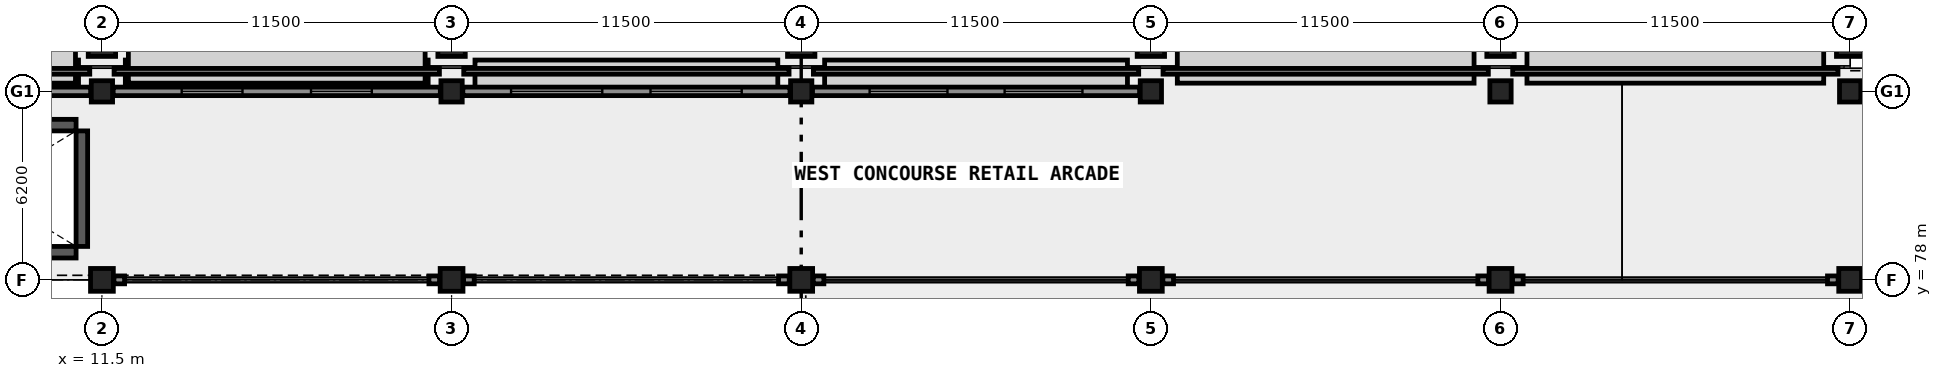
"""IFC4 building model, lengths in metres.
Left out: names, types, materials, properties, quantities, classifications, styles, units other than length and angle.
Written with IfcOpenShell. Run it as: python <this file> out.ifc"""

import sys

from ifc_helpers import new_model, si_unit, direction, frame, frame_2d, origin, origin_2d, place, context, subcontext, project, spatial, rectangle, extrude, element, fill, save


model = new_model("IFC4")
c1 = context("Model", 3, precision=1e-05, world=origin(), true_north=direction((0.0, 1.0)))
c2 = subcontext(c1, "Body", "Model", "MODEL_VIEW")
j1 = project(units=[si_unit("LENGTHUNIT", "METRE"), si_unit("PLANEANGLEUNIT", "RADIAN")], contexts=[c1])
p1 = place(None, origin())
s1 = spatial("IfcSite", under=j1, at=p1, CompositionType="ELEMENT")
p2 = place(p1, origin())
s2 = spatial("IfcBuilding", under=s1, at=p2, CompositionType="ELEMENT")
p3 = place(p2, frame((0.0, 0.0, 8.4)))
s3 = spatial("IfcBuildingStorey", under=s2, at=p3, CompositionType="ELEMENT", Elevation=8.4)
p4 = place(p3, frame((11.5, 78.0, 0.0), z_axis=(0.0, 0.0, 1.0), x_axis=(1.0, 0.0, 0.0)))
e1 = element("IfcColumn", 1, at=p4, inside=s3, PredefinedType="COLUMN", context=c2, shape_type="SweptSolid", body=[
    extrude(rectangle(XDim=0.75, YDim=0.75, at=origin_2d()), origin(), (0.0, 0.0, 1.0), 5.4),
])
p5 = place(p3, frame((11.5, 84.2, 0.0), z_axis=(0.0, 0.0, 1.0), x_axis=(1.0, 0.0, 0.0)))
e2 = element("IfcColumn", 2, at=p5, inside=s3, PredefinedType="COLUMN", context=c2, shape_type="SweptSolid", body=[
    extrude(rectangle(XDim=0.7, YDim=0.7, at=origin_2d()), origin(), (0.0, 0.0, 1.0), 5.4),
])
p6 = place(p3, frame((11.5, 85.8, 0.0), z_axis=(0.0, 0.0, 1.0), x_axis=(1.0, 0.0, 0.0)))
e3 = element("IfcColumn", 3, at=p6, inside=s3, PredefinedType="COLUMN", context=c2, shape_type="SweptSolid", body=[
    extrude(rectangle(XDim=0.9, YDim=0.9, at=origin_2d()), origin(), (0.0, 0.0, 1.0), 5.4),
])
p7 = place(p3, frame((23.0, 78.0, 0.0), z_axis=(0.0, 0.0, 1.0), x_axis=(1.0, 0.0, 0.0)))
e4 = element("IfcColumn", 4, at=p7, inside=s3, PredefinedType="COLUMN", context=c2, shape_type="SweptSolid", body=[
    extrude(rectangle(XDim=0.75, YDim=0.75, at=origin_2d()), origin(), (0.0, 0.0, 1.0), 5.4),
])
p8 = place(p3, frame((23.0, 84.2, 0.0), z_axis=(0.0, 0.0, 1.0), x_axis=(1.0, 0.0, 0.0)))
e5 = element("IfcColumn", 5, at=p8, inside=s3, PredefinedType="COLUMN", context=c2, shape_type="SweptSolid", body=[
    extrude(rectangle(XDim=0.7, YDim=0.7, at=origin_2d()), origin(), (0.0, 0.0, 1.0), 5.4),
])
p9 = place(p3, frame((23.0, 85.8, 0.0), z_axis=(0.0, 0.0, 1.0), x_axis=(1.0, 0.0, 0.0)))
e6 = element("IfcColumn", 6, at=p9, inside=s3, PredefinedType="COLUMN", context=c2, shape_type="SweptSolid", body=[
    extrude(rectangle(XDim=0.9, YDim=0.9, at=origin_2d()), origin(), (0.0, 0.0, 1.0), 5.4),
])
p10 = place(p3, frame((34.5, 78.0, 0.0), z_axis=(0.0, 0.0, 1.0), x_axis=(1.0, 0.0, 0.0)))
e7 = element("IfcColumn", 7, at=p10, inside=s3, PredefinedType="COLUMN", context=c2, shape_type="SweptSolid", body=[
    extrude(rectangle(XDim=0.75, YDim=0.75, at=origin_2d()), origin(), (0.0, 0.0, 1.0), 5.4),
])
p11 = place(p3, frame((34.5, 84.2, 0.0), z_axis=(0.0, 0.0, 1.0), x_axis=(1.0, 0.0, 0.0)))
e8 = element("IfcColumn", 8, at=p11, inside=s3, PredefinedType="COLUMN", context=c2, shape_type="SweptSolid", body=[
    extrude(rectangle(XDim=0.7, YDim=0.7, at=origin_2d()), origin(), (0.0, 0.0, 1.0), 5.4),
])
p12 = place(p3, frame((34.5, 85.8, 0.0), z_axis=(0.0, 0.0, 1.0), x_axis=(1.0, 0.0, 0.0)))
e9 = element("IfcColumn", 9, at=p12, inside=s3, PredefinedType="COLUMN", context=c2, shape_type="SweptSolid", body=[
    extrude(rectangle(XDim=0.9, YDim=0.9, at=origin_2d()), origin(), (0.0, 0.0, 1.0), 5.4),
])
p13 = place(p3, frame((46.0, 78.0, 0.0), z_axis=(0.0, 0.0, 1.0), x_axis=(1.0, 0.0, 0.0)))
e10 = element("IfcColumn", 10, at=p13, inside=s3, PredefinedType="COLUMN", context=c2, shape_type="SweptSolid", body=[
    extrude(rectangle(XDim=0.75, YDim=0.75, at=origin_2d()), origin(), (0.0, 0.0, 1.0), 5.4),
])
p14 = place(p3, frame((46.0, 84.2, 0.0), z_axis=(0.0, 0.0, 1.0), x_axis=(1.0, 0.0, 0.0)))
e11 = element("IfcColumn", 11, at=p14, inside=s3, PredefinedType="COLUMN", context=c2, shape_type="SweptSolid", body=[
    extrude(rectangle(XDim=0.7, YDim=0.7, at=origin_2d()), origin(), (0.0, 0.0, 1.0), 5.4),
])
p15 = place(p3, frame((46.0, 85.8, 0.0), z_axis=(0.0, 0.0, 1.0), x_axis=(1.0, 0.0, 0.0)))
e12 = element("IfcColumn", 12, at=p15, inside=s3, PredefinedType="COLUMN", context=c2, shape_type="SweptSolid", body=[
    extrude(rectangle(XDim=0.9, YDim=0.9, at=origin_2d()), origin(), (0.0, 0.0, 1.0), 5.4),
])
p16 = place(p3, frame((57.5, 78.0, 0.0), z_axis=(0.0, 0.0, 1.0), x_axis=(1.0, 0.0, 0.0)))
e13 = element("IfcColumn", 13, at=p16, inside=s3, PredefinedType="COLUMN", context=c2, shape_type="SweptSolid", body=[
    extrude(rectangle(XDim=0.75, YDim=0.75, at=origin_2d()), origin(), (0.0, 0.0, 1.0), 5.4),
])
p17 = place(p3, frame((57.5, 84.2, 0.0), z_axis=(0.0, 0.0, 1.0), x_axis=(1.0, 0.0, 0.0)))
e14 = element("IfcColumn", 14, at=p17, inside=s3, PredefinedType="COLUMN", context=c2, shape_type="SweptSolid", body=[
    extrude(rectangle(XDim=0.7, YDim=0.7, at=origin_2d()), origin(), (0.0, 0.0, 1.0), 5.4),
])
p18 = place(p3, frame((57.5, 85.8, 0.0), z_axis=(0.0, 0.0, 1.0), x_axis=(1.0, 0.0, 0.0)))
e15 = element("IfcColumn", 15, at=p18, inside=s3, PredefinedType="COLUMN", context=c2, shape_type="SweptSolid", body=[
    extrude(rectangle(XDim=0.9, YDim=0.9, at=origin_2d()), origin(), (0.0, 0.0, 1.0), 5.4),
])
p19 = place(p3, frame((69.0, 78.0, 0.0), z_axis=(0.0, 0.0, 1.0), x_axis=(1.0, 0.0, 0.0)))
e16 = element("IfcColumn", 16, at=p19, inside=s3, PredefinedType="COLUMN", context=c2, shape_type="SweptSolid", body=[
    extrude(rectangle(XDim=0.75, YDim=0.75, at=origin_2d()), origin(), (0.0, 0.0, 1.0), 5.4),
])
p20 = place(p3, frame((69.0, 84.2, 0.0), z_axis=(0.0, 0.0, 1.0), x_axis=(1.0, 0.0, 0.0)))
e17 = element("IfcColumn", 17, at=p20, inside=s3, PredefinedType="COLUMN", context=c2, shape_type="SweptSolid", body=[
    extrude(rectangle(XDim=0.7, YDim=0.7, at=origin_2d()), origin(), (0.0, 0.0, 1.0), 5.4),
])
p21 = place(p3, frame((69.0, 85.8, 0.0), z_axis=(0.0, 0.0, 1.0), x_axis=(1.0, 0.0, 0.0)))
e18 = element("IfcColumn", 18, at=p21, inside=s3, PredefinedType="COLUMN", context=c2, shape_type="SweptSolid", body=[
    extrude(rectangle(XDim=0.9, YDim=0.9, at=origin_2d()), origin(), (0.0, 0.0, 1.0), 5.4),
])
p22 = place(p3, frame((2.05, 78.91, 0.0), z_axis=(0.0, 0.0, 1.0), x_axis=(1.0, 0.0, 0.0)))
e19 = element("IfcWall", 19, at=p22, inside=s3, PredefinedType="SHEAR", context=c2, shape_type="SweptSolid", body=[
    extrude(rectangle(XDim=8.6, YDim=0.38, at=frame_2d((4.3, 0.0))), origin(), (0.0, 0.0, 1.0), 5.4),
])
p23 = place(p22, frame((0.55, 0.0, 0.0)))
e20 = element("IfcOpeningElement", 20, at=p23, cuts=e19, PredefinedType="OPENING", context=c2, shape_type="SweptSolid", body=[
    extrude(rectangle(XDim=1.13, YDim=2.15, at=frame_2d((0.565, 1.075))), frame((0.0, 0.2, 0.0), z_axis=(0.0, -1.0, 0.0), x_axis=(1.0, 0.0, 0.0)), (0.0, 0.0, 1.0), 0.4),
])
p24 = place(p3, frame((2.05, 83.09, 0.0), z_axis=(0.0, 0.0, 1.0), x_axis=(1.0, 0.0, 0.0)))
e21 = element("IfcWall", 21, at=p24, inside=s3, PredefinedType="SHEAR", context=c2, shape_type="SweptSolid", body=[
    extrude(rectangle(XDim=8.6, YDim=0.38, at=frame_2d((4.3, 0.0))), origin(), (0.0, 0.0, 1.0), 5.4),
])
p25 = place(p3, frame((10.84, 79.1, 0.0), z_axis=(0.0, 0.0, 1.0), x_axis=(0.0, 1.0, 0.0)))
e22 = element("IfcWall", 22, at=p25, inside=s3, PredefinedType="SHEAR", context=c2, shape_type="SweptSolid", body=[
    extrude(rectangle(XDim=3.8, YDim=0.38, at=frame_2d((1.9, 0.0))), origin(), (0.0, 0.0, 1.0), 5.4),
])
for number, where, z_axis, x_axis in (
    (23, (11.895, 78.0, 0.0), (0.0, 0.0, 1.0), (1.0, 0.0, 0.0)),
    (24, (22.255, 78.0, 0.0), (0.0, 0.0, 1.0), (1.0, 0.0, 0.0)),
    (25, (23.395, 78.0, 0.0), (0.0, 0.0, 1.0), (1.0, 0.0, 0.0)),
    (26, (33.755, 78.0, 0.0), (0.0, 0.0, 1.0), (1.0, 0.0, 0.0)),
    (27, (34.895, 78.0, 0.0), (0.0, 0.0, 1.0), (1.0, 0.0, 0.0)),
    (28, (45.255, 78.0, 0.0), (0.0, 0.0, 1.0), (1.0, 0.0, 0.0)),
    (29, (46.395, 78.0, 0.0), (0.0, 0.0, 1.0), (1.0, 0.0, 0.0)),
    (30, (56.755, 78.0, 0.0), (0.0, 0.0, 1.0), (1.0, 0.0, 0.0)),
    (31, (57.895, 78.0, 0.0), (0.0, 0.0, 1.0), (1.0, 0.0, 0.0)),
    (32, (68.255, 78.0, 0.0), (0.0, 0.0, 1.0), (1.0, 0.0, 0.0)),
    (33, (69.395, 78.0, 0.0), (0.0, 0.0, 1.0), (1.0, 0.0, 0.0)),
):
    element("IfcWall", number, at=place(p3, frame(where, z_axis=z_axis, x_axis=x_axis)), inside=s3, PredefinedType="SOLIDWALL", context=c2, shape_type="SweptSolid", body=[
        extrude(rectangle(XDim=0.35, YDim=0.26, at=frame_2d((0.175, 0.0))), origin(), (0.0, 0.0, 1.0), 5.1),
    ])
p26 = place(p3, frame((69.37, 84.2, 0.0), z_axis=(0.0, 0.0, 1.0), x_axis=(1.0, 0.0, 0.0)))
e34 = element("IfcWall", 34, at=p26, inside=s3, PredefinedType="SOLIDWALL", context=c2, shape_type="SweptSolid", body=[
    extrude(rectangle(XDim=0.35, YDim=0.26, at=frame_2d((0.175, 0.0))), origin(), (0.0, 0.0, 1.0), 5.1),
])
for number, where, z_axis, x_axis in (
    (35, (0.4, 84.86, 0.0), (0.0, 0.0, 1.0), (1.0, 0.0, 0.0)),
    (36, (11.9, 84.86, 0.0), (0.0, 0.0, 1.0), (1.0, 0.0, 0.0)),
    (37, (23.4, 84.86, 0.0), (0.0, 0.0, 1.0), (1.0, 0.0, 0.0)),
    (38, (34.9, 84.86, 0.0), (0.0, 0.0, 1.0), (1.0, 0.0, 0.0)),
    (39, (46.4, 84.86, 0.0), (0.0, 0.0, 1.0), (1.0, 0.0, 0.0)),
    (40, (57.9, 84.86, 0.0), (0.0, 0.0, 1.0), (1.0, 0.0, 0.0)),
):
    element("IfcWall", number, at=place(p3, frame(where, z_axis=z_axis, x_axis=x_axis)), inside=s3, PredefinedType="PARAPET", context=c2, shape_type="SweptSolid", body=[
        extrude(rectangle(XDim=10.7, YDim=0.19, at=frame_2d((5.35, 0.0))), origin(), (0.0, 0.0, 1.0), 1.15),
    ])
p27 = place(p3, frame((34.87, 84.2, 0.0), z_axis=(0.0, 0.0, 1.0), x_axis=(1.0, 0.0, 0.0)))
e41 = element("IfcWall", 41, at=p27, inside=s3, PredefinedType="SOLIDWALL", context=c2, shape_type="SweptSolid", body=[
    extrude(rectangle(XDim=10.76, YDim=0.28, at=frame_2d((5.38, 0.0))), origin(), (0.0, 0.0, 1.0), 4.25),
])
p28 = place(p27, frame((1.88, 0.0, 0.85)))
e42 = element("IfcOpeningElement", 42, at=p28, cuts=e41, PredefinedType="OPENING", context=c2, shape_type="SweptSolid", body=[
    extrude(rectangle(XDim=2.56, YDim=2.18, at=frame_2d((1.28, 1.09))), frame((0.0, 0.15, 0.0), z_axis=(0.0, -1.0, 0.0), x_axis=(1.0, 0.0, 0.0)), (0.0, 0.0, 1.0), 0.3),
])
p29 = place(p27, frame((6.32, 0.0, 0.85)))
e43 = element("IfcOpeningElement", 43, at=p29, cuts=e41, PredefinedType="OPENING", context=c2, shape_type="SweptSolid", body=[
    extrude(rectangle(XDim=2.56, YDim=2.18, at=frame_2d((1.28, 1.09))), frame((0.0, 0.15, 0.0), z_axis=(0.0, -1.0, 0.0), x_axis=(1.0, 0.0, 0.0)), (0.0, 0.0, 1.0), 0.3),
])
p30 = place(p3, frame((0.37, 84.2, 0.0), z_axis=(0.0, 0.0, 1.0), x_axis=(1.0, 0.0, 0.0)))
e44 = element("IfcWall", 44, at=p30, inside=s3, PredefinedType="SOLIDWALL", context=c2, shape_type="SweptSolid", body=[
    extrude(rectangle(XDim=10.76, YDim=0.28, at=frame_2d((5.38, 0.0))), origin(), (0.0, 0.0, 1.0), 4.25),
])
p31 = place(p30, frame((1.92, 0.0, 0.85)))
e45 = element("IfcOpeningElement", 45, at=p31, cuts=e44, PredefinedType="OPENING", context=c2, shape_type="SweptSolid", body=[
    extrude(rectangle(XDim=2.5, YDim=2.2, at=frame_2d((1.25, 1.1))), frame((0.0, 0.15, 0.0), z_axis=(0.0, -1.0, 0.0), x_axis=(1.0, 0.0, 0.0)), (0.0, 0.0, 1.0), 0.3),
])
p32 = place(p30, frame((6.34, 0.0, 0.85)))
e46 = element("IfcOpeningElement", 46, at=p32, cuts=e44, PredefinedType="OPENING", context=c2, shape_type="SweptSolid", body=[
    extrude(rectangle(XDim=2.5, YDim=2.2, at=frame_2d((1.25, 1.1))), frame((0.0, 0.15, 0.0), z_axis=(0.0, -1.0, 0.0), x_axis=(1.0, 0.0, 0.0)), (0.0, 0.0, 1.0), 0.3),
])
p33 = place(p3, frame((11.87, 84.2, 0.0), z_axis=(0.0, 0.0, 1.0), x_axis=(1.0, 0.0, 0.0)))
e47 = element("IfcWall", 47, at=p33, inside=s3, PredefinedType="SOLIDWALL", context=c2, shape_type="SweptSolid", body=[
    extrude(rectangle(XDim=10.76, YDim=0.28, at=frame_2d((5.38, 0.0))), origin(), (0.0, 0.0, 1.0), 4.25),
])
p34 = place(p33, frame((2.253, 0.0, 0.85)))
e48 = element("IfcOpeningElement", 48, at=p34, cuts=e47, PredefinedType="OPENING", context=c2, shape_type="SweptSolid", body=[
    extrude(rectangle(XDim=2.0, YDim=2.2, at=frame_2d((1.0, 1.1))), frame((0.0, 0.15, 0.0), z_axis=(0.0, -1.0, 0.0), x_axis=(1.0, 0.0, 0.0)), (0.0, 0.0, 1.0), 0.3),
])
p35 = place(p33, frame((6.507, 0.0, 0.85)))
e49 = element("IfcOpeningElement", 49, at=p35, cuts=e47, PredefinedType="OPENING", context=c2, shape_type="SweptSolid", body=[
    extrude(rectangle(XDim=2.0, YDim=2.2, at=frame_2d((1.0, 1.1))), frame((0.0, 0.15, 0.0), z_axis=(0.0, -1.0, 0.0), x_axis=(1.0, 0.0, 0.0)), (0.0, 0.0, 1.0), 0.3),
])
p36 = place(p3, frame((23.37, 84.2, 0.0), z_axis=(0.0, 0.0, 1.0), x_axis=(1.0, 0.0, 0.0)))
e50 = element("IfcWall", 50, at=p36, inside=s3, PredefinedType="SOLIDWALL", context=c2, shape_type="SweptSolid", body=[
    extrude(rectangle(XDim=10.76, YDim=0.28, at=frame_2d((5.38, 0.0))), origin(), (0.0, 0.0, 1.0), 4.25),
])
p37 = place(p36, frame((1.587, 0.0, 0.85)))
e51 = element("IfcOpeningElement", 51, at=p37, cuts=e50, PredefinedType="OPENING", context=c2, shape_type="SweptSolid", body=[
    extrude(rectangle(XDim=3.0, YDim=2.0, at=frame_2d((1.5, 1.0))), frame((0.0, 0.15, 0.0), z_axis=(0.0, -1.0, 0.0), x_axis=(1.0, 0.0, 0.0)), (0.0, 0.0, 1.0), 0.3),
])
p38 = place(p36, frame((6.173, 0.0, 0.85)))
e52 = element("IfcOpeningElement", 52, at=p38, cuts=e50, PredefinedType="OPENING", context=c2, shape_type="SweptSolid", body=[
    extrude(rectangle(XDim=3.0, YDim=2.0, at=frame_2d((1.5, 1.0))), frame((0.0, 0.15, 0.0), z_axis=(0.0, -1.0, 0.0), x_axis=(1.0, 0.0, 0.0)), (0.0, 0.0, 1.0), 0.3),
])
p39 = place(p28, origin())
e53 = element("IfcWindow", 53, at=p39, inside=s3, PartitioningType="SINGLE_PANEL", PredefinedType="WINDOW", context=c2, shape_type="SweptSolid", body=[
    extrude(rectangle(XDim=2.56, YDim=2.18, at=frame_2d((1.28, 1.09))), frame((0.0, 0.03, 0.0), z_axis=(0.0, -1.0, 0.0), x_axis=(1.0, 0.0, 0.0)), (0.0, 0.0, 1.0), 0.06),
])
fill(e42, e53)
p40 = place(p29, origin())
e54 = element("IfcWindow", 54, at=p40, inside=s3, PartitioningType="SINGLE_PANEL", PredefinedType="WINDOW", context=c2, shape_type="SweptSolid", body=[
    extrude(rectangle(XDim=2.56, YDim=2.18, at=frame_2d((1.28, 1.09))), frame((0.0, 0.03, 0.0), z_axis=(0.0, -1.0, 0.0), x_axis=(1.0, 0.0, 0.0)), (0.0, 0.0, 1.0), 0.06),
])
fill(e43, e54)
p41 = place(p34, origin())
e55 = element("IfcWindow", 55, at=p41, inside=s3, PartitioningType="SINGLE_PANEL", PredefinedType="WINDOW", context=c2, shape_type="SweptSolid", body=[
    extrude(rectangle(XDim=2.0, YDim=2.2, at=frame_2d((1.0, 1.1))), frame((0.0, 0.03, 0.0), z_axis=(0.0, -1.0, 0.0), x_axis=(1.0, 0.0, 0.0)), (0.0, 0.0, 1.0), 0.06),
])
fill(e48, e55)
p42 = place(p35, origin())
e56 = element("IfcWindow", 56, at=p42, inside=s3, PartitioningType="SINGLE_PANEL", PredefinedType="WINDOW", context=c2, shape_type="SweptSolid", body=[
    extrude(rectangle(XDim=2.0, YDim=2.2, at=frame_2d((1.0, 1.1))), frame((0.0, 0.03, 0.0), z_axis=(0.0, -1.0, 0.0), x_axis=(1.0, 0.0, 0.0)), (0.0, 0.0, 1.0), 0.06),
])
fill(e49, e56)
p43 = place(p37, origin())
e57 = element("IfcWindow", 57, at=p43, inside=s3, PartitioningType="SINGLE_PANEL", PredefinedType="WINDOW", context=c2, shape_type="SweptSolid", body=[
    extrude(rectangle(XDim=3.0, YDim=2.0, at=frame_2d((1.5, 1.0))), frame((0.0, 0.03, 0.0), z_axis=(0.0, -1.0, 0.0), x_axis=(1.0, 0.0, 0.0)), (0.0, 0.0, 1.0), 0.06),
])
fill(e51, e57)
p44 = place(p38, origin())
e58 = element("IfcWindow", 58, at=p44, inside=s3, PartitioningType="SINGLE_PANEL", PredefinedType="WINDOW", context=c2, shape_type="SweptSolid", body=[
    extrude(rectangle(XDim=3.0, YDim=2.0, at=frame_2d((1.5, 1.0))), frame((0.0, 0.03, 0.0), z_axis=(0.0, -1.0, 0.0), x_axis=(1.0, 0.0, 0.0)), (0.0, 0.0, 1.0), 0.06),
])
fill(e52, e58)
save(model, sys.argv[1])
